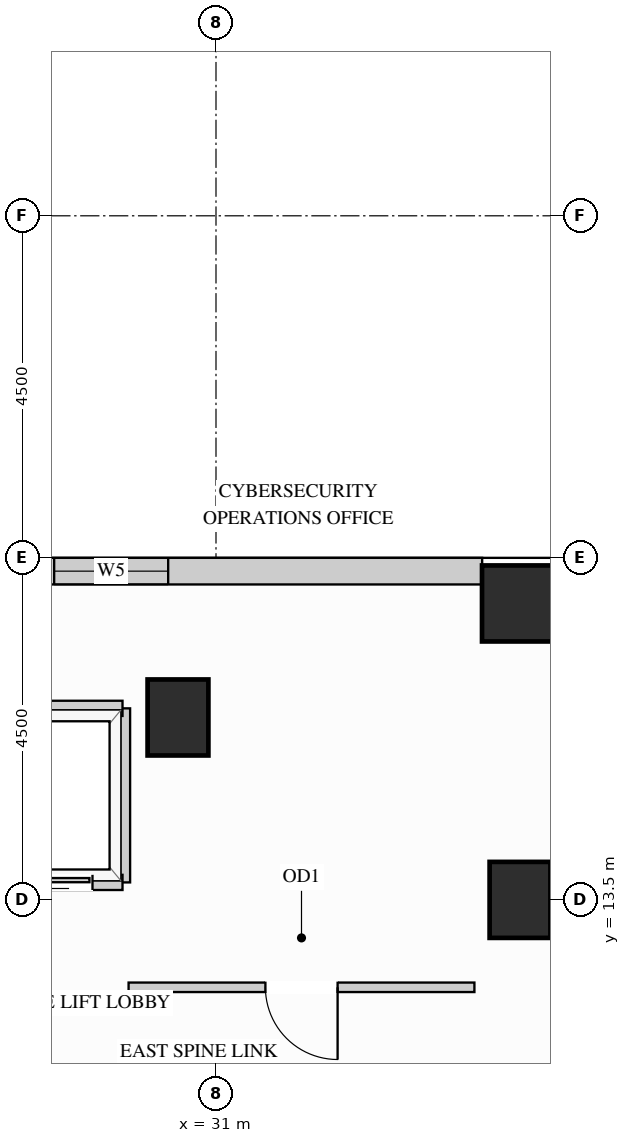
"""IFC4 building model, lengths in metres.
Left out: names, types, materials, properties, quantities, classifications, styles, units other than length and angle.
Written with IfcOpenShell. Run it as: python <this file> out.ifc"""

import sys

from ifc_helpers import new_model, si_unit, direction, frame, frame_2d, origin, origin_2d, place, context, subcontext, project, spatial, rectangle, extrude, source, transform, mapped, element, fill, save


model = new_model("IFC4")
c1 = context("Model", 3, precision=1e-05, world=origin(), true_north=direction((0.0, 1.0)))
c2 = subcontext(c1, "Body", "Model", "MODEL_VIEW")
j1 = project(units=[si_unit("LENGTHUNIT", "METRE"), si_unit("PLANEANGLEUNIT", "RADIAN")], contexts=[c1])
p1 = place(None, origin())
s1 = spatial("IfcSite", under=j1, at=p1, CompositionType="ELEMENT")
p2 = place(p1, origin())
s2 = spatial("IfcBuilding", under=s1, at=p2, CompositionType="ELEMENT")
p3 = place(p2, frame((0.0, 0.0, 143.1)))
s3 = spatial("IfcBuildingStorey", under=s2, at=p3, CompositionType="ELEMENT", Elevation=143.1)
m1 = source(origin(), c2, "Body", "SweptSolid", [
    extrude(rectangle(XDim=0.8, YDim=1.0, at=origin_2d()), origin(), (0.0, 0.0, 1.0), 3.4),
])
for number, where, z_axis, x_axis in (
    (1, (35.0, 13.5, 0.0), (0.0, 0.0, 1.0), (1.0, 0.0, 0.0)),
    (2, (30.5, 15.9, 0.0), (0.0, 0.0, 1.0), (1.0, 0.0, 0.0)),
):
    element("IfcColumn", number, at=place(p3, frame(where, z_axis=z_axis, x_axis=x_axis)), inside=s3, PredefinedType="COLUMN", context=c2, shape_type="MappedRepresentation", body=[
        mapped(m1, transform((0.0, 0.0, 0.0), x_axis=(1.0, 0.0, 0.0), y_axis=(0.0, 1.0, 0.0), z_axis=(0.0, 0.0, 1.0))),
    ])
m2 = source(origin(), c2, "Body", "SweptSolid", [
    extrude(rectangle(XDim=1.0, YDim=1.0, at=origin_2d()), origin(), (0.0, 0.0, 1.0), 3.4),
])
p4 = place(p3, frame((35.0, 17.4, 0.0), z_axis=(0.0, 0.0, 1.0), x_axis=(1.0, 0.0, 0.0)))
e3 = element("IfcColumn", 3, at=p4, inside=s3, PredefinedType="COLUMN", context=c2, shape_type="MappedRepresentation", body=[
    mapped(m2, transform((0.0, 0.0, 0.0), x_axis=(1.0, 0.0, 0.0), y_axis=(0.0, 1.0, 0.0), z_axis=(0.0, 0.0, 1.0))),
])
p5 = place(p3, frame((34.502, 17.825, 0.0), z_axis=(0.0, 0.0, 1.0), x_axis=(-1.0, 0.0, 0.0)))
e4 = element("IfcWall", 4, at=p5, inside=s3, PredefinedType="SOLIDWALL", context=c2, shape_type="SweptSolid", body=[
    extrude(rectangle(XDim=15.104, YDim=0.35, at=frame_2d((7.552, 0.0))), origin(), (0.0, 0.0, 1.0), 3.385),
])
p6 = place(p5, frame((4.131, 0.0, 0.78)))
e5 = element("IfcOpeningElement", 5, at=p6, cuts=e4, PredefinedType="OPENING", context=c2, shape_type="SweptSolid", body=[
    extrude(rectangle(XDim=1.5, YDim=2.0, at=frame_2d((0.75, 1.0))), frame((0.0, 0.185, 0.0), z_axis=(0.0, -1.0, 0.0), x_axis=(1.0, 0.0, 0.0)), (0.0, 0.0, 1.0), 0.37),
])
p7 = place(p5, frame((9.442, 0.0, 0.78)))
e6 = element("IfcOpeningElement", 6, at=p7, cuts=e4, PredefinedType="OPENING", context=c2, shape_type="SweptSolid", body=[
    extrude(rectangle(XDim=1.5, YDim=2.0, at=frame_2d((0.75, 1.0))), frame((0.0, 0.185, 0.0), z_axis=(0.0, -1.0, 0.0), x_axis=(1.0, 0.0, 0.0)), (0.0, 0.0, 1.0), 0.37),
])
p8 = place(p3, frame((29.85, 12.35, 0.0), z_axis=(0.0, 0.0, 1.0), x_axis=(1.0, 0.0, 0.0)))
e7 = element("IfcWall", 7, at=p8, inside=s3, PredefinedType="PARTITIONING", context=c2, shape_type="SweptSolid", body=[
    extrude(rectangle(XDim=4.55, YDim=0.125, at=frame_2d((2.275, 0.0))), origin(), (0.0, 0.0, 1.0), 3.385),
])
p9 = place(p8, frame((1.8, 0.0, 0.0)))
e8 = element("IfcOpeningElement", 8, at=p9, cuts=e7, PredefinedType="OPENING", context=c2, shape_type="SweptSolid", body=[
    extrude(rectangle(XDim=0.95, YDim=2.15, at=frame_2d((0.475, 1.075))), frame((0.0, 0.073, 0.0), z_axis=(0.0, -1.0, 0.0), x_axis=(1.0, 0.0, 0.0)), (0.0, 0.0, 1.0), 0.145),
])
m3 = source(origin(), c2, "Body", "SweptSolid", [
    extrude(rectangle(XDim=2.29, YDim=0.2, at=frame_2d((1.145, 0.0))), origin(), (0.0, 0.0, 1.0), 3.385),
])
p10 = place(p3, frame((29.77, 13.73, 0.0), z_axis=(0.0, 0.0, 1.0), x_axis=(0.0, 1.0, 0.0)))
e9 = element("IfcWall", 9, at=p10, inside=s3, PredefinedType="PARTITIONING", context=c2, shape_type="MappedRepresentation", body=[
    mapped(m3, transform((0.0, 0.0, 0.0), x_axis=(1.0, 0.0, 0.0), y_axis=(0.0, 1.0, 0.0), z_axis=(0.0, 0.0, 1.0))),
])
m4 = source(origin(), c2, "Body", "SweptSolid", [
    extrude(rectangle(XDim=1.89, YDim=0.2, at=frame_2d((0.945, 0.0))), origin(), (0.0, 0.0, 1.0), 2.773),
])
p11 = place(p3, frame((27.88, 16.02, 0.0), z_axis=(0.0, 0.0, 1.0), x_axis=(1.0, 0.0, 0.0)))
e10 = element("IfcWall", 10, at=p11, inside=s3, PredefinedType="PARTITIONING", context=c2, shape_type="MappedRepresentation", body=[
    mapped(m4, transform((0.0, 0.0, 0.0), x_axis=(1.0, 0.0, 0.0), y_axis=(0.0, 1.0, 0.0), z_axis=(0.0, 0.0, 1.0))),
])
p12 = place(p3, frame((27.88, 13.73, 0.0), z_axis=(0.0, 0.0, 1.0), x_axis=(1.0, 0.0, 0.0)))
e11 = element("IfcWall", 11, at=p12, inside=s3, PredefinedType="PARTITIONING", context=c2, shape_type="SweptSolid", body=[
    extrude(rectangle(XDim=1.89, YDim=0.2, at=frame_2d((0.945, 0.0))), origin(), (0.0, 0.0, 1.0), 2.466),
])
p13 = place(p12, frame((0.395, 0.0, 0.0)))
e12 = element("IfcOpeningElement", 12, at=p13, cuts=e11, PredefinedType="OPENING", context=c2, shape_type="SweptSolid", body=[
    extrude(rectangle(XDim=1.1, YDim=2.2, at=frame_2d((0.55, 1.1))), frame((0.0, 0.11, 0.0), z_axis=(0.0, -1.0, 0.0), x_axis=(1.0, 0.0, 0.0)), (0.0, 0.0, 1.0), 0.22),
])
m5 = source(origin(), c2, "Body", "SweptSolid", [
    extrude(rectangle(XDim=1.1, YDim=2.2, at=frame_2d((0.55, 1.1))), frame((0.0, 0.025, 0.0), z_axis=(0.0, -1.0, 0.0), x_axis=(1.0, 0.0, 0.0)), (0.0, 0.0, 1.0), 0.05),
])
p14 = place(p13, origin())
e13 = element("IfcDoor", 13, at=p14, inside=s3, OperationType="SLIDING_TO_LEFT", PredefinedType="DOOR", context=c2, shape_type="MappedRepresentation", body=[
    mapped(m5, transform((0.0, 0.0, 0.0), x_axis=(1.0, 0.0, 0.0), y_axis=(0.0, 1.0, 0.0), z_axis=(0.0, 0.0, 1.0))),
])
fill(e12, e13)
m6 = source(origin(), c2, "Body", "SweptSolid", [
    extrude(rectangle(XDim=0.95, YDim=2.15, at=frame_2d((0.475, 1.075))), frame((0.0, 0.025, 0.0), z_axis=(0.0, -1.0, 0.0), x_axis=(1.0, 0.0, 0.0)), (0.0, 0.0, 1.0), 0.05),
])
p15 = place(p9, origin())
e14 = element("IfcDoor", 14, at=p15, inside=s3, OperationType="SINGLE_SWING_RIGHT", PredefinedType="DOOR", context=c2, shape_type="MappedRepresentation", body=[
    mapped(m6, transform((0.0, 0.0, 0.0), x_axis=(1.0, 0.0, 0.0), y_axis=(0.0, 1.0, 0.0), z_axis=(0.0, 0.0, 1.0))),
])
fill(e8, e14)
m7 = source(origin(), c2, "Body", "SweptSolid", [
    extrude(rectangle(XDim=1.5, YDim=2.0, at=frame_2d((0.75, 1.0))), frame((0.0, 0.03, 0.0), z_axis=(0.0, -1.0, 0.0), x_axis=(1.0, 0.0, 0.0)), (0.0, 0.0, 1.0), 0.06),
])
p16 = place(p6, origin())
e15 = element("IfcWindow", 15, at=p16, inside=s3, PartitioningType="SINGLE_PANEL", PredefinedType="WINDOW", context=c2, shape_type="MappedRepresentation", body=[
    mapped(m7, transform((0.0, 0.0, 0.0), x_axis=(1.0, 0.0, 0.0), y_axis=(0.0, 1.0, 0.0), z_axis=(0.0, 0.0, 1.0))),
])
fill(e5, e15)
save(model, sys.argv[1])
